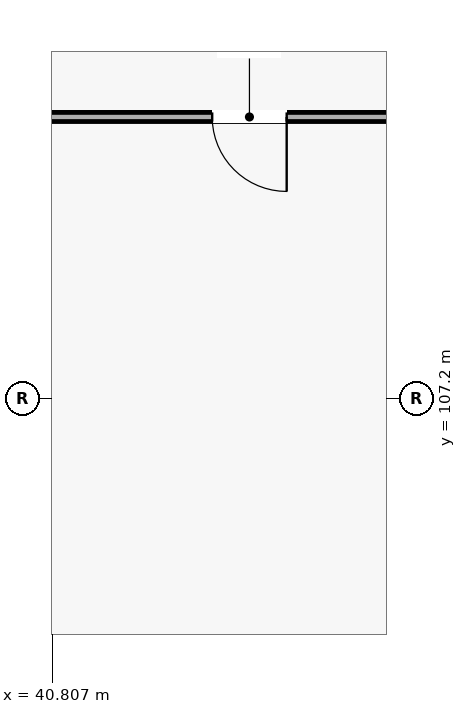
"""IFC4 building model, lengths in metres.
Left out: names, types, materials, properties, quantities, classifications, styles, units other than length and angle.
Written with IfcOpenShell. Run it as: python <this file> out.ifc"""

import sys

from ifc_helpers import new_model, si_unit, direction, frame, frame_2d, origin, place, context, subcontext, project, spatial, rectangle, extrude, element, fill, save


model = new_model("IFC4")
c1 = context("Model", 3, precision=1e-05, world=origin(), true_north=direction((0.0, 1.0)))
c2 = subcontext(c1, "Body", "Model", "MODEL_VIEW")
j1 = project(units=[si_unit("LENGTHUNIT", "METRE"), si_unit("PLANEANGLEUNIT", "RADIAN")], contexts=[c1])
p1 = place(None, origin())
s1 = spatial("IfcSite", under=j1, at=p1, CompositionType="ELEMENT")
p2 = place(p1, origin())
s2 = spatial("IfcBuilding", under=s1, at=p2, CompositionType="ELEMENT")
p3 = place(p2, frame((0.0, 0.0, 9.45)))
s3 = spatial("IfcBuildingStorey", under=s2, at=p3, CompositionType="ELEMENT", Elevation=9.45)
p4 = place(p3, frame((29.2, 110.9, 0.0), z_axis=(0.0, 0.0, 1.0), x_axis=(1.0, 0.0, 0.0)))
e1 = element("IfcWall", 1, at=p4, inside=s3, PredefinedType="PARTITIONING", context=c2, shape_type="SweptSolid", body=[
    extrude(rectangle(XDim=28.4, YDim=0.12, at=frame_2d((14.2, 0.0))), origin(), (0.0, 0.0, 1.0), 3.97),
])
p5 = place(p4, frame((13.71, 0.0, 0.0)))
e2 = element("IfcOpeningElement", 2, at=p5, cuts=e1, PredefinedType="OPENING", context=c2, shape_type="SweptSolid", body=[
    extrude(rectangle(XDim=0.98, YDim=2.1, at=frame_2d((0.49, 1.05))), frame((0.0, 0.07, 0.0), z_axis=(0.0, -1.0, 0.0), x_axis=(1.0, 0.0, 0.0)), (0.0, 0.0, 1.0), 0.14),
])
p6 = place(p5, frame((0.98, 0.0, 0.0), z_axis=(0.0, 0.0, 1.0), x_axis=(-1.0, 0.0, 0.0)))
e3 = element("IfcDoor", 3, at=p6, inside=s3, OperationType="SINGLE_SWING_RIGHT", PredefinedType="DOOR", context=c2, shape_type="SweptSolid", body=[
    extrude(rectangle(XDim=0.98, YDim=2.1, at=frame_2d((0.49, 1.05))), frame((0.0, 0.025, 0.0), z_axis=(0.0, -1.0, 0.0), x_axis=(1.0, 0.0, 0.0)), (0.0, 0.0, 1.0), 0.05),
])
fill(e2, e3)
save(model, sys.argv[1])
